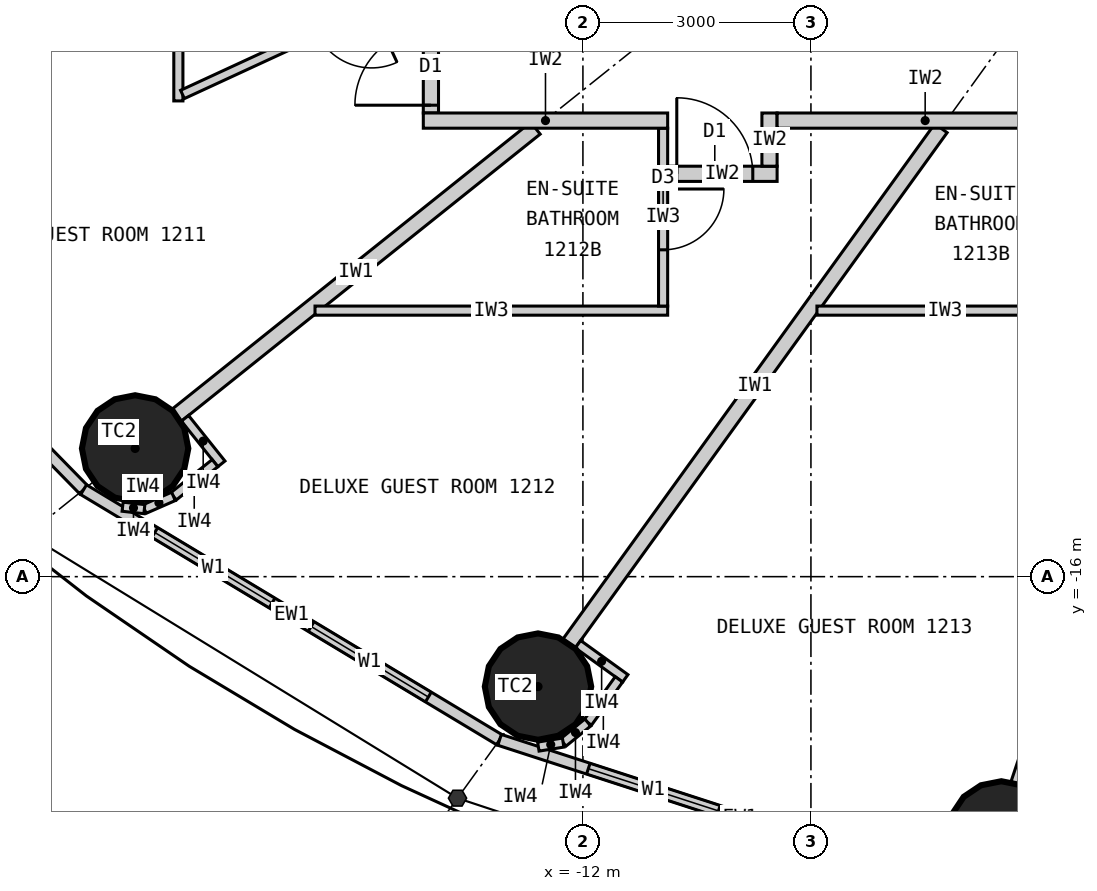
"""IFC4 building model, lengths in metres.
Left out: names, types, materials, properties, quantities, classifications, styles, units other than length and angle.
Written with IfcOpenShell. Run it as: python <this file> out.ifc"""

import sys

from ifc_helpers import new_model, si_unit, direction, frame, frame_2d, origin, origin_2d, place, context, subcontext, project, spatial, rectangle, circle, extrude, element, fill, save


model = new_model("IFC4")
c1 = context("Model", 3, precision=1e-05, world=origin(), true_north=direction((0.0, 1.0)))
c2 = subcontext(c1, "Body", "Model", "MODEL_VIEW")
j1 = project(units=[si_unit("LENGTHUNIT", "METRE"), si_unit("PLANEANGLEUNIT", "RADIAN")], contexts=[c1])
p1 = place(None, origin())
s1 = spatial("IfcSite", under=j1, at=p1, CompositionType="ELEMENT")
p2 = place(p1, origin())
s2 = spatial("IfcBuilding", under=s1, at=p2, CompositionType="ELEMENT")
p3 = place(p2, frame((0.0, 0.0, 54.0)))
s3 = spatial("IfcBuildingStorey", under=s2, at=p3, CompositionType="ELEMENT", Elevation=54.0)
for number, where, z_axis, x_axis in (
    (1, (-17.892, -14.313, 0.0), (0.0, 0.0, 1.0), (1.0, 0.0, 0.0)),
    (2, (-12.591, -17.447, 0.0), (0.0, 0.0, 1.0), (1.0, 0.0, 0.0)),
    (3, (-6.495, -19.391, 0.0), (0.0, 0.0, 1.0), (1.0, 0.0, 0.0)),
):
    element("IfcColumn", number, at=place(p3, frame(where, z_axis=z_axis, x_axis=x_axis)), inside=s3, PredefinedType="COLUMN", context=c2, shape_type="SweptSolid", body=[
        extrude(circle(Radius=0.7, at=origin_2d()), origin(), (0.0, 0.0, 1.0), 3.3),
    ])
p4 = place(p3, frame((-22.803, -10.532, 0.0), z_axis=(0.0, 0.0, 1.0), x_axis=(0.699602905915, -0.714531856557, 0.0)))
e4 = element("IfcWall", 4, at=p4, inside=s3, PredefinedType="ELEMENTEDWALL", context=c2, shape_type="SweptSolid", body=[
    extrude(rectangle(XDim=6.051, YDim=0.15, at=frame_2d((3.025, 0.0))), origin(), (0.0, 0.0, 1.0), 3.12),
])
p5 = place(p4, frame((0.926, 0.0, 0.9)))
e5 = element("IfcOpeningElement", 5, at=p5, cuts=e4, PredefinedType="OPENING", context=c2, shape_type="SweptSolid", body=[
    extrude(rectangle(XDim=1.8, YDim=1.9, at=frame_2d((0.9, 0.95))), frame((0.0, 0.085, 0.0), z_axis=(0.0, -1.0, 0.0), x_axis=(1.0, 0.0, 0.0)), (0.0, 0.0, 1.0), 0.17),
])
p6 = place(p4, frame((3.325, 0.0, 0.9)))
e6 = element("IfcOpeningElement", 6, at=p6, cuts=e4, PredefinedType="OPENING", context=c2, shape_type="SweptSolid", body=[
    extrude(rectangle(XDim=1.8, YDim=1.9, at=frame_2d((0.9, 0.95))), frame((0.0, 0.085, 0.0), z_axis=(0.0, -1.0, 0.0), x_axis=(1.0, 0.0, 0.0)), (0.0, 0.0, 1.0), 0.17),
])
p7 = place(p3, frame((-18.57, -14.856, 0.0), z_axis=(0.0, 0.0, 1.0), x_axis=(0.856983180864, -0.515344377787, 0.0)))
e7 = element("IfcWall", 7, at=p7, inside=s3, PredefinedType="ELEMENTEDWALL", context=c2, shape_type="SweptSolid", body=[
    extrude(rectangle(XDim=6.386, YDim=0.15, at=frame_2d((3.193, 0.0))), origin(), (0.0, 0.0, 1.0), 3.12),
])
p8 = place(p7, frame((1.093, 0.0, 0.9)))
e8 = element("IfcOpeningElement", 8, at=p8, cuts=e7, PredefinedType="OPENING", context=c2, shape_type="SweptSolid", body=[
    extrude(rectangle(XDim=1.8, YDim=1.9, at=frame_2d((0.9, 0.95))), frame((0.0, 0.085, 0.0), z_axis=(0.0, -1.0, 0.0), x_axis=(1.0, 0.0, 0.0)), (0.0, 0.0, 1.0), 0.17),
])
p9 = place(p7, frame((3.493, 0.0, 0.9)))
e9 = element("IfcOpeningElement", 9, at=p9, cuts=e7, PredefinedType="OPENING", context=c2, shape_type="SweptSolid", body=[
    extrude(rectangle(XDim=1.8, YDim=1.9, at=frame_2d((0.9, 0.95))), frame((0.0, 0.085, 0.0), z_axis=(0.0, -1.0, 0.0), x_axis=(1.0, 0.0, 0.0)), (0.0, 0.0, 1.0), 0.17),
])
p10 = place(p3, frame((-13.096, -18.147, 0.0), z_axis=(0.0, 0.0, 1.0), x_axis=(0.951137534625, -0.308767534285, 0.0)))
e10 = element("IfcWall", 10, at=p10, inside=s3, PredefinedType="ELEMENTEDWALL", context=c2, shape_type="SweptSolid", body=[
    extrude(rectangle(XDim=6.655, YDim=0.15, at=frame_2d((3.328, 0.0))), origin(), (0.0, 0.0, 1.0), 3.12),
])
p11 = place(p10, frame((1.228, 0.0, 0.9)))
e11 = element("IfcOpeningElement", 11, at=p11, cuts=e10, PredefinedType="OPENING", context=c2, shape_type="SweptSolid", body=[
    extrude(rectangle(XDim=1.8, YDim=1.9, at=frame_2d((0.9, 0.95))), frame((0.0, 0.085, 0.0), z_axis=(0.0, -1.0, 0.0), x_axis=(1.0, 0.0, 0.0)), (0.0, 0.0, 1.0), 0.17),
])
p12 = place(p10, frame((3.628, 0.0, 0.9)))
e12 = element("IfcOpeningElement", 12, at=p12, cuts=e10, PredefinedType="OPENING", context=c2, shape_type="SweptSolid", body=[
    extrude(rectangle(XDim=1.8, YDim=1.9, at=frame_2d((0.9, 0.95))), frame((0.0, 0.085, 0.0), z_axis=(0.0, -1.0, 0.0), x_axis=(1.0, 0.0, 0.0)), (0.0, 0.0, 1.0), 0.17),
])
p13 = place(p3, frame((-14.1, -6.512, 0.0), z_axis=(0.0, 0.0, 1.0), x_axis=(-0.907832871056, -0.419332181247, 0.0)))
e13 = element("IfcWall", 13, at=p13, inside=s3, PredefinedType="PARTITIONING", context=c2, shape_type="SweptSolid", body=[
    extrude(rectangle(XDim=8.023, YDim=0.2, at=frame_2d((4.011, 0.0))), origin(), (0.0, 0.0, 1.0), 2.32),
])
p14 = place(p3, frame((-12.625, -10.1, 0.0), z_axis=(0.0, 0.0, 1.0), x_axis=(-0.780892451574, -0.624665493744, 0.0)))
e14 = element("IfcWall", 14, at=p14, inside=s3, PredefinedType="PARTITIONING", context=c2, shape_type="SweptSolid", body=[
    extrude(rectangle(XDim=6.045, YDim=0.2, at=frame_2d((3.022, 0.0))), origin(), (0.0, 0.0, 1.0), 2.32),
])
p15 = place(p3, frame((-7.289, -10.1, 0.0), z_axis=(0.0, 0.0, 1.0), x_axis=(-0.585198353053, -0.810890182197, 0.0)))
e15 = element("IfcWall", 15, at=p15, inside=s3, PredefinedType="PARTITIONING", context=c2, shape_type="SweptSolid", body=[
    extrude(rectangle(XDim=8.36, YDim=0.2, at=frame_2d((4.18, 0.0))), origin(), (0.0, 0.0, 1.0), 2.32),
])
p16 = place(p3, frame((-3.383, -10.1, 0.0), z_axis=(0.0, 0.0, 1.0), x_axis=(-0.31759592231, -0.948226149256, 0.0)))
e16 = element("IfcWall", 16, at=p16, inside=s3, PredefinedType="PARTITIONING", context=c2, shape_type="SweptSolid", body=[
    extrude(rectangle(XDim=9.098, YDim=0.2, at=frame_2d((4.549, 0.0))), origin(), (0.0, 0.0, 1.0), 2.32),
])
p17 = place(p3, frame((-17.323, -8.101, 0.0), z_axis=(0.0, 0.0, 1.0), x_axis=(0.0, -1.0, 0.0)))
e17 = element("IfcWall", 17, at=p17, inside=s3, PredefinedType="PARTITIONING", context=c2, shape_type="SweptSolid", body=[
    extrude(rectangle(XDim=1.64, YDim=0.12, at=frame_2d((0.82, 0.0))), origin(), (0.0, 0.0, 1.0), 3.12),
])
p18 = place(p3, frame((-14.1, -8.193, 0.0), z_axis=(0.0, 0.0, 1.0), x_axis=(-0.907836493557, -0.419324338628, 0.0)))
e18 = element("IfcWall", 18, at=p18, inside=s3, PredefinedType="PARTITIONING", context=c2, shape_type="SweptSolid", body=[
    extrude(rectangle(XDim=3.49, YDim=0.12, at=frame_2d((1.745, 0.0))), origin(), (0.0, 0.0, 1.0), 3.12),
])
p19 = place(p18, frame((0.75, 0.0, 0.0)))
e19 = element("IfcOpeningElement", 19, at=p19, cuts=e18, PredefinedType="OPENING", context=c2, shape_type="SweptSolid", body=[
    extrude(rectangle(XDim=0.8, YDim=2.1, at=frame_2d((0.4, 1.05))), frame((0.0, 0.07, 0.0), z_axis=(0.0, -1.0, 0.0), x_axis=(1.0, 0.0, 0.0)), (0.0, 0.0, 1.0), 0.14),
])
p20 = place(p3, frame((-15.525, -12.5, 0.0), z_axis=(0.0, 0.0, 1.0), x_axis=(1.0, 0.0, 0.0)))
e20 = element("IfcWall", 20, at=p20, inside=s3, PredefinedType="PARTITIONING", context=c2, shape_type="SweptSolid", body=[
    extrude(rectangle(XDim=4.64, YDim=0.12, at=frame_2d((2.32, 0.0))), origin(), (0.0, 0.0, 1.0), 3.12),
])
p21 = place(p3, frame((-10.945, -10.1, 0.0), z_axis=(0.0, 0.0, 1.0), x_axis=(0.0, -1.0, 0.0)))
e21 = element("IfcWall", 21, at=p21, inside=s3, PredefinedType="PARTITIONING", context=c2, shape_type="SweptSolid", body=[
    extrude(rectangle(XDim=2.34, YDim=0.12, at=frame_2d((1.17, 0.0))), origin(), (0.0, 0.0, 1.0), 3.12),
])
p22 = place(p21, frame((0.8, 0.0, 0.0)))
e22 = element("IfcOpeningElement", 22, at=p22, cuts=e21, PredefinedType="OPENING", context=c2, shape_type="SweptSolid", body=[
    extrude(rectangle(XDim=0.8, YDim=2.1, at=frame_2d((0.4, 1.05))), frame((0.0, 0.07, 0.0), z_axis=(0.0, -1.0, 0.0), x_axis=(1.0, 0.0, 0.0)), (0.0, 0.0, 1.0), 0.14),
])
p23 = place(p3, frame((-8.921, -12.5, 0.0), z_axis=(0.0, 0.0, 1.0), x_axis=(1.0, 0.0, 0.0)))
e23 = element("IfcWall", 23, at=p23, inside=s3, PredefinedType="PARTITIONING", context=c2, shape_type="SweptSolid", body=[
    extrude(rectangle(XDim=3.372, YDim=0.12, at=frame_2d((1.686, 0.0))), origin(), (0.0, 0.0, 1.0), 3.12),
])
p24 = place(p3, frame((-9.445, -10.7, 0.0), z_axis=(0.0, 0.0, 1.0), x_axis=(-1.0, 0.0, 0.0)))
e24 = element("IfcWall", 24, at=p24, inside=s3, PredefinedType="PARTITIONING", context=c2, shape_type="SweptSolid", body=[
    extrude(rectangle(XDim=1.44, YDim=0.2, at=frame_2d((0.72, 0.0))), origin(), (0.0, 0.0, 1.0), 3.12),
])
p25 = place(p24, frame((0.32, 0.0, 0.0)))
e25 = element("IfcOpeningElement", 25, at=p25, cuts=e24, PredefinedType="OPENING", context=c2, shape_type="SweptSolid", body=[
    extrude(rectangle(XDim=1.0, YDim=2.2, at=frame_2d((0.5, 1.1))), frame((0.0, 0.11, 0.0), z_axis=(0.0, -1.0, 0.0), x_axis=(1.0, 0.0, 0.0)), (0.0, 0.0, 1.0), 0.22),
])
p26 = place(p3, frame((-9.545, -9.9, 0.0), z_axis=(0.0, 0.0, 1.0), x_axis=(0.0, -1.0, 0.0)))
e26 = element("IfcWall", 26, at=p26, inside=s3, PredefinedType="PARTITIONING", context=c2, shape_type="SweptSolid", body=[
    extrude(rectangle(XDim=0.7, YDim=0.2, at=frame_2d((0.35, 0.0))), origin(), (0.0, 0.0, 1.0), 3.12),
])
p27 = place(p3, frame((-14.0, -4.772, 0.0), z_axis=(0.0, 0.0, 1.0), x_axis=(0.0, -1.0, 0.0)))
e27 = element("IfcWall", 27, at=p27, inside=s3, PredefinedType="PARTITIONING", context=c2, shape_type="SweptSolid", body=[
    extrude(rectangle(XDim=5.127, YDim=0.2, at=frame_2d((2.564, 0.0))), origin(), (0.0, 0.0, 1.0), 3.12),
])
p28 = place(p27, frame((4.025, 0.0, 0.0)))
e28 = element("IfcOpeningElement", 28, at=p28, cuts=e27, PredefinedType="OPENING", context=c2, shape_type="SweptSolid", body=[
    extrude(rectangle(XDim=1.0, YDim=2.2, at=frame_2d((0.5, 1.1))), frame((0.0, 0.11, 0.0), z_axis=(0.0, -1.0, 0.0), x_axis=(1.0, 0.0, 0.0)), (0.0, 0.0, 1.0), 0.22),
])
p29 = place(p3, frame((-5.549, -10.0, 0.0), z_axis=(0.0, 0.0, 1.0), x_axis=(-1.0, 0.0, 0.0)))
e29 = element("IfcWall", 29, at=p29, inside=s3, PredefinedType="PARTITIONING", context=c2, shape_type="SweptSolid", body=[
    extrude(rectangle(XDim=3.896, YDim=0.2, at=frame_2d((1.948, 0.0))), origin(), (0.0, 0.0, 1.0), 3.12),
])
p30 = place(p3, frame((-10.885, -10.0, 0.0), z_axis=(0.0, 0.0, 1.0), x_axis=(-1.0, 0.0, 0.0)))
e30 = element("IfcWall", 30, at=p30, inside=s3, PredefinedType="PARTITIONING", context=c2, shape_type="SweptSolid", body=[
    extrude(rectangle(XDim=3.215, YDim=0.2, at=frame_2d((1.607, 0.0))), origin(), (0.0, 0.0, 1.0), 3.12),
])
p31 = place(p3, frame((-17.236, -13.917, 0.0), z_axis=(0.0, 0.0, 1.0), x_axis=(0.624695047554, -0.780868809443, 0.0)))
e31 = element("IfcWall", 31, at=p31, inside=s3, PredefinedType="PARTITIONING", context=c2, shape_type="SweptSolid", body=[
    extrude(rectangle(XDim=0.768, YDim=0.12, at=frame_2d((0.384, 0.0))), origin(), (0.0, 0.0, 1.0), 3.12),
])
p32 = place(p3, frame((-16.841, -14.507, 0.0), z_axis=(0.0, 0.0, 1.0), x_axis=(-0.780902834923, -0.62465251333, 0.0)))
e32 = element("IfcWall", 32, at=p32, inside=s3, PredefinedType="PARTITIONING", context=c2, shape_type="SweptSolid", body=[
    extrude(rectangle(XDim=0.7, YDim=0.12, at=frame_2d((0.35, 0.0))), origin(), (0.0, 0.0, 1.0), 3.12),
])
p33 = place(p3, frame((-17.387, -14.944, 0.0), z_axis=(0.0, 0.0, 1.0), x_axis=(-0.916036698064, -0.401094462441, 0.0)))
e33 = element("IfcWall", 33, at=p33, inside=s3, PredefinedType="PARTITIONING", context=c2, shape_type="SweptSolid", body=[
    extrude(rectangle(XDim=0.418, YDim=0.12, at=frame_2d((0.209, 0.0))), origin(), (0.0, 0.0, 1.0), 3.12),
])
p34 = place(p3, frame((-17.77, -15.112, 0.0), z_axis=(0.0, 0.0, 1.0), x_axis=(-0.993904401174, 0.110245368731, 0.0)))
e34 = element("IfcWall", 34, at=p34, inside=s3, PredefinedType="PARTITIONING", context=c2, shape_type="SweptSolid", body=[
    extrude(rectangle(XDim=0.288, YDim=0.12, at=frame_2d((0.144, 0.0))), origin(), (0.0, 0.0, 1.0), 3.12),
])
p35 = place(p3, frame((-12.065, -16.889, 0.0), z_axis=(0.0, 0.0, 1.0), x_axis=(0.810821798253, -0.585293098778, 0.0)))
e35 = element("IfcWall", 35, at=p35, inside=s3, PredefinedType="PARTITIONING", context=c2, shape_type="SweptSolid", body=[
    extrude(rectangle(XDim=0.768, YDim=0.12, at=frame_2d((0.384, 0.0))), origin(), (0.0, 0.0, 1.0), 3.12),
])
p36 = place(p3, frame((-11.526, -17.351, 0.0), z_axis=(0.0, 0.0, 1.0), x_axis=(-0.585223113993, -0.810872312296, 0.0)))
e36 = element("IfcWall", 36, at=p36, inside=s3, PredefinedType="PARTITIONING", context=c2, shape_type="SweptSolid", body=[
    extrude(rectangle(XDim=0.7, YDim=0.12, at=frame_2d((0.35, 0.0))), origin(), (0.0, 0.0, 1.0), 3.12),
])
p37 = place(p3, frame((-11.936, -17.919, 0.0), z_axis=(0.0, 0.0, 1.0), x_axis=(-0.775023088441, -0.631932917629, 0.0)))
e37 = element("IfcWall", 37, at=p37, inside=s3, PredefinedType="PARTITIONING", context=c2, shape_type="SweptSolid", body=[
    extrude(rectangle(XDim=0.418, YDim=0.12, at=frame_2d((0.209, 0.0))), origin(), (0.0, 0.0, 1.0), 3.12),
])
p38 = place(p3, frame((-12.26, -18.183, 0.0), z_axis=(0.0, 0.0, 1.0), x_axis=(-0.987218661664, -0.159371622511, 0.0)))
e38 = element("IfcWall", 38, at=p38, inside=s3, PredefinedType="PARTITIONING", context=c2, shape_type="SweptSolid", body=[
    extrude(rectangle(XDim=0.331, YDim=0.12, at=frame_2d((0.166, 0.0))), origin(), (0.0, 0.0, 1.0), 3.12),
])
p39 = place(p8, origin())
e39 = element("IfcWindow", 39, at=p39, inside=s3, PartitioningType="SINGLE_PANEL", PredefinedType="WINDOW", context=c2, shape_type="SweptSolid", body=[
    extrude(rectangle(XDim=1.8, YDim=1.9, at=frame_2d((0.9, 0.95))), frame((0.0, 0.03, 0.0), z_axis=(0.0, -1.0, 0.0), x_axis=(1.0, 0.0, 0.0)), (0.0, 0.0, 1.0), 0.06),
])
fill(e8, e39)
p40 = place(p9, origin())
e40 = element("IfcWindow", 40, at=p40, inside=s3, PartitioningType="SINGLE_PANEL", PredefinedType="WINDOW", context=c2, shape_type="SweptSolid", body=[
    extrude(rectangle(XDim=1.8, YDim=1.9, at=frame_2d((0.9, 0.95))), frame((0.0, 0.03, 0.0), z_axis=(0.0, -1.0, 0.0), x_axis=(1.0, 0.0, 0.0)), (0.0, 0.0, 1.0), 0.06),
])
fill(e9, e40)
p41 = place(p11, origin())
e41 = element("IfcWindow", 41, at=p41, inside=s3, PartitioningType="SINGLE_PANEL", PredefinedType="WINDOW", context=c2, shape_type="SweptSolid", body=[
    extrude(rectangle(XDim=1.8, YDim=1.9, at=frame_2d((0.9, 0.95))), frame((0.0, 0.03, 0.0), z_axis=(0.0, -1.0, 0.0), x_axis=(1.0, 0.0, 0.0)), (0.0, 0.0, 1.0), 0.06),
])
fill(e11, e41)
p42 = place(p28, origin())
e42 = element("IfcDoor", 42, at=p42, inside=s3, OperationType="SINGLE_SWING_RIGHT", PredefinedType="DOOR", context=c2, shape_type="SweptSolid", body=[
    extrude(rectangle(XDim=1.0, YDim=2.2, at=frame_2d((0.5, 1.1))), frame((0.0, 0.025, 0.0), z_axis=(0.0, -1.0, 0.0), x_axis=(1.0, 0.0, 0.0)), (0.0, 0.0, 1.0), 0.05),
])
fill(e28, e42)
p43 = place(p22, origin())
e43 = element("IfcDoor", 43, at=p43, inside=s3, OperationType="SINGLE_SWING_LEFT", PredefinedType="DOOR", context=c2, shape_type="SweptSolid", body=[
    extrude(rectangle(XDim=0.8, YDim=2.1, at=frame_2d((0.4, 1.05))), frame((0.0, 0.025, 0.0), z_axis=(0.0, -1.0, 0.0), x_axis=(1.0, 0.0, 0.0)), (0.0, 0.0, 1.0), 0.05),
])
fill(e22, e43)
p44 = place(p25, origin())
e44 = element("IfcDoor", 44, at=p44, inside=s3, OperationType="SINGLE_SWING_RIGHT", PredefinedType="DOOR", context=c2, shape_type="SweptSolid", body=[
    extrude(rectangle(XDim=1.0, YDim=2.2, at=frame_2d((0.5, 1.1))), frame((0.0, 0.025, 0.0), z_axis=(0.0, -1.0, 0.0), x_axis=(1.0, 0.0, 0.0)), (0.0, 0.0, 1.0), 0.05),
])
fill(e25, e44)
save(model, sys.argv[1])
